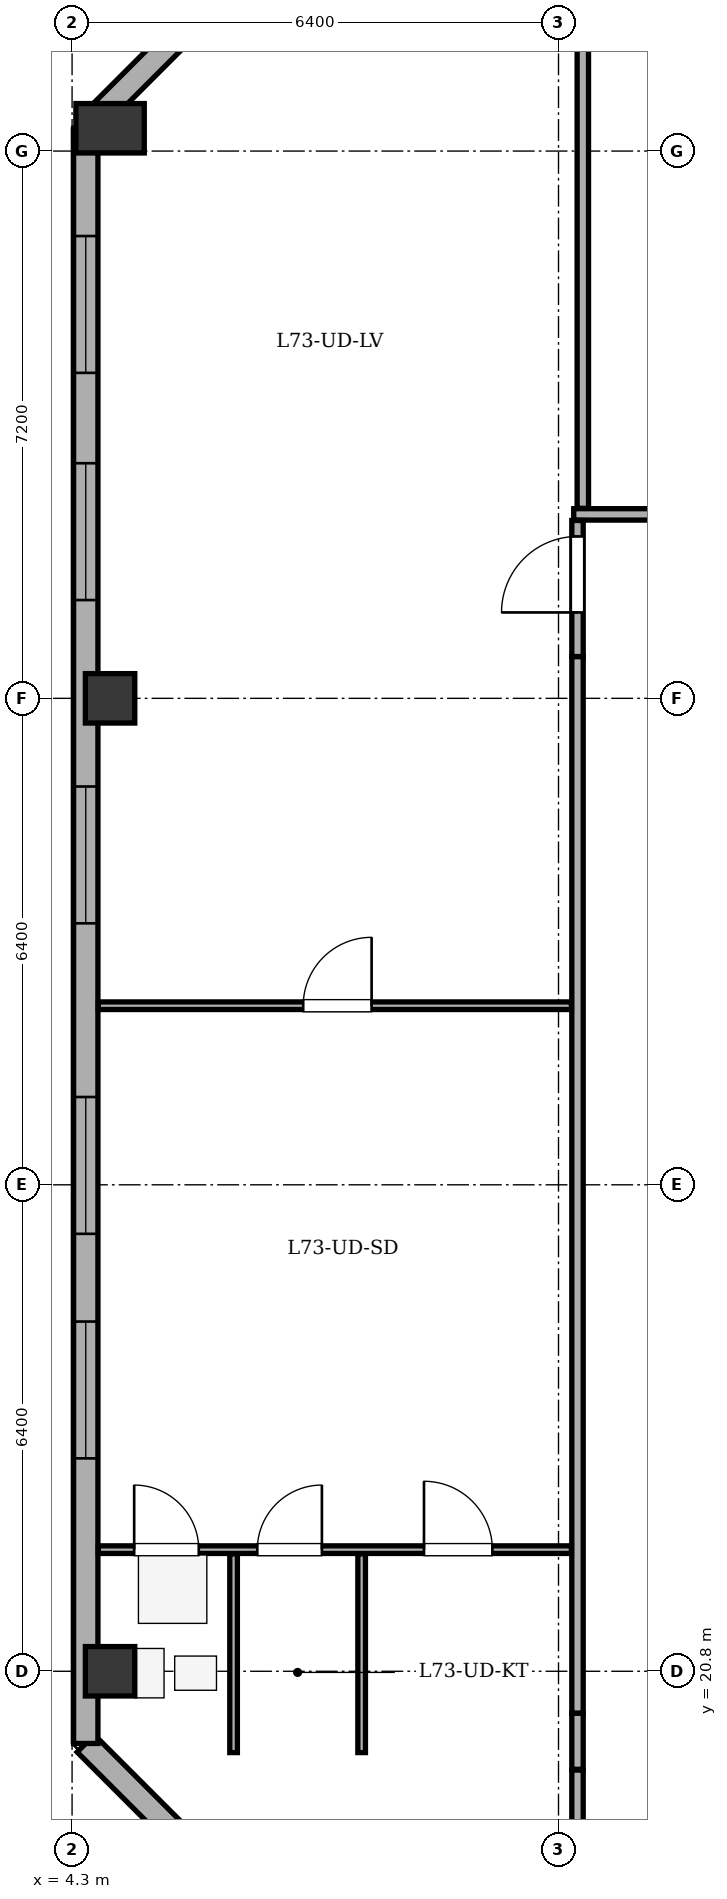
"""IFC4 building model, lengths in metres.
Left out: names, types, materials, properties, quantities, classifications, styles, units other than length and angle.
Written with IfcOpenShell. Run it as: python <this file> out.ifc"""

import sys

from ifc_helpers import new_model, si_unit, direction, frame, frame_2d, origin, origin_2d, place, context, subcontext, project, spatial, rectangle, extrude, element, fill, save


model = new_model("IFC4")
c1 = context("Model", 3, precision=1e-05, world=origin(), true_north=direction((0.0, 1.0)))
c2 = subcontext(c1, "Body", "Model", "MODEL_VIEW")
j1 = project(units=[si_unit("LENGTHUNIT", "METRE"), si_unit("PLANEANGLEUNIT", "RADIAN")], contexts=[c1])
p1 = place(None, origin())
s1 = spatial("IfcSite", under=j1, at=p1, CompositionType="ELEMENT")
p2 = place(p1, origin())
s2 = spatial("IfcBuilding", under=s1, at=p2, CompositionType="ELEMENT")
p3 = place(p2, frame((0.0, 0.0, 275.5)))
s3 = spatial("IfcBuildingStorey", under=s2, at=p3, CompositionType="ELEMENT", Elevation=275.5)
for number, where, z_axis, x_axis in (
    (1, (4.8, 20.8, 0.0), (0.0, 0.0, 1.0), (1.0, 0.0, 0.0)),
    (2, (4.8, 33.6, 0.0), (0.0, 0.0, 1.0), (1.0, 0.0, 0.0)),
):
    element("IfcColumn", number, at=place(p3, frame(where, z_axis=z_axis, x_axis=x_axis)), inside=s3, PredefinedType="COLUMN", context=c2, shape_type="SweptSolid", body=[
        extrude(rectangle(XDim=0.65, YDim=0.65, at=origin_2d()), origin(), (0.0, 0.0, 1.0), 3.4),
    ])
p4 = place(p3, frame((4.8, 41.1, 0.0), z_axis=(0.0, 0.0, 1.0), x_axis=(1.0, 0.0, 0.0)))
e3 = element("IfcColumn", 3, at=p4, inside=s3, PredefinedType="COLUMN", context=c2, shape_type="SweptSolid", body=[
    extrude(rectangle(XDim=0.65, YDim=0.9, at=origin_2d()), origin(), (0.0, 0.0, 1.0), 3.4),
])
p5 = place(p3, frame((8.3, 16.03, 0.0), z_axis=(0.0, 0.0, 1.0), x_axis=(-0.707106781187, 0.707106781187, 0.0)))
e4 = element("IfcWall", 4, at=p5, inside=s3, PredefinedType="STANDARD", context=c2, shape_type="SweptSolid", body=[
    extrude(rectangle(XDim=5.402, YDim=0.32, at=frame_2d((2.701, 0.0))), origin(), (0.0, 0.0, 1.0), 2.725),
])
p6 = place(p5, frame((2.001, 0.0, 0.75)))
e5 = element("IfcOpeningElement", 5, at=p6, cuts=e4, PredefinedType="OPENING", context=c2, shape_type="SweptSolid", body=[
    extrude(rectangle(XDim=1.4, YDim=1.65, at=frame_2d((0.7, 0.825))), frame((0.0, 0.17, 0.0), z_axis=(0.0, -1.0, 0.0), x_axis=(1.0, 0.0, 0.0)), (0.0, 0.0, 1.0), 0.34),
])
p7 = place(p3, frame((4.48, 19.85, 0.0), z_axis=(0.0, 0.0, 1.0), x_axis=(0.0, 1.0, 0.0)))
e6 = element("IfcWall", 6, at=p7, inside=s3, PredefinedType="STANDARD", context=c2, shape_type="SweptSolid", body=[
    extrude(rectangle(XDim=21.25, YDim=0.32, at=frame_2d((10.625, 0.0))), origin(), (0.0, 0.0, 1.0), 2.725),
])
p8 = place(p7, frame((3.751, 0.0, 0.75)))
e7 = element("IfcOpeningElement", 7, at=p8, cuts=e6, PredefinedType="OPENING", context=c2, shape_type="SweptSolid", body=[
    extrude(rectangle(XDim=1.8, YDim=1.7, at=frame_2d((0.9, 0.85))), frame((0.0, 0.17, 0.0), z_axis=(0.0, -1.0, 0.0), x_axis=(1.0, 0.0, 0.0)), (0.0, 0.0, 1.0), 0.34),
])
p9 = place(p7, frame((6.705, 0.0, 0.75)))
e8 = element("IfcOpeningElement", 8, at=p9, cuts=e6, PredefinedType="OPENING", context=c2, shape_type="SweptSolid", body=[
    extrude(rectangle(XDim=1.8, YDim=1.7, at=frame_2d((0.9, 0.85))), frame((0.0, 0.17, 0.0), z_axis=(0.0, -1.0, 0.0), x_axis=(1.0, 0.0, 0.0)), (0.0, 0.0, 1.0), 0.34),
])
p10 = place(p7, frame((10.79, 0.0, 0.75)))
e9 = element("IfcOpeningElement", 9, at=p10, cuts=e6, PredefinedType="OPENING", context=c2, shape_type="SweptSolid", body=[
    extrude(rectangle(XDim=1.8, YDim=1.7, at=frame_2d((0.9, 0.85))), frame((0.0, 0.17, 0.0), z_axis=(0.0, -1.0, 0.0), x_axis=(1.0, 0.0, 0.0)), (0.0, 0.0, 1.0), 0.34),
])
p11 = place(p7, frame((15.043, 0.0, 0.75)))
e10 = element("IfcOpeningElement", 10, at=p11, cuts=e6, PredefinedType="OPENING", context=c2, shape_type="SweptSolid", body=[
    extrude(rectangle(XDim=1.8, YDim=1.7, at=frame_2d((0.9, 0.85))), frame((0.0, 0.17, 0.0), z_axis=(0.0, -1.0, 0.0), x_axis=(1.0, 0.0, 0.0)), (0.0, 0.0, 1.0), 0.34),
])
p12 = place(p7, frame((18.032, 0.0, 0.75)))
e11 = element("IfcOpeningElement", 11, at=p12, cuts=e6, PredefinedType="OPENING", context=c2, shape_type="SweptSolid", body=[
    extrude(rectangle(XDim=1.8, YDim=1.7, at=frame_2d((0.9, 0.85))), frame((0.0, 0.17, 0.0), z_axis=(0.0, -1.0, 0.0), x_axis=(1.0, 0.0, 0.0)), (0.0, 0.0, 1.0), 0.34),
])
p13 = place(p3, frame((4.48, 41.1, 0.0), z_axis=(0.0, 0.0, 1.0), x_axis=(0.70712937715, 0.707084184501, 0.0)))
e12 = element("IfcWall", 12, at=p13, inside=s3, PredefinedType="STANDARD", context=c2, shape_type="SweptSolid", body=[
    extrude(rectangle(XDim=5.402, YDim=0.32, at=frame_2d((2.701, 0.0))), origin(), (0.0, 0.0, 1.0), 2.725),
])
p14 = place(p13, frame((2.001, 0.0, 0.75)))
e13 = element("IfcOpeningElement", 13, at=p14, cuts=e12, PredefinedType="OPENING", context=c2, shape_type="SweptSolid", body=[
    extrude(rectangle(XDim=1.4, YDim=1.65, at=frame_2d((0.7, 0.825))), frame((0.0, 0.17, 0.0), z_axis=(0.0, -1.0, 0.0), x_axis=(1.0, 0.0, 0.0)), (0.0, 0.0, 1.0), 0.34),
])
p15 = place(p3, frame((10.9, 36.02, 0.0), z_axis=(0.0, 0.0, 1.0), x_axis=(1.0, 0.0, 0.0)))
e14 = element("IfcWall", 14, at=p15, inside=s3, PredefinedType="PARTITIONING", context=c2, shape_type="SweptSolid", body=[
    extrude(rectangle(XDim=34.52, YDim=0.15, at=frame_2d((17.26, 0.0))), origin(), (0.0, 0.0, 1.0), 3.1),
])
p16 = place(p15, frame((5.276, 0.0, 0.0)))
e15 = element("IfcOpeningElement", 15, at=p16, cuts=e14, PredefinedType="OPENING", context=c2, shape_type="SweptSolid", body=[
    extrude(rectangle(XDim=1.0, YDim=2.1, at=frame_2d((0.5, 1.05))), frame((0.0, 0.085, 0.0), z_axis=(0.0, -1.0, 0.0), x_axis=(1.0, 0.0, 0.0)), (0.0, 0.0, 1.0), 0.17),
])
p17 = place(p15, frame((16.931, 0.0, 0.0)))
e16 = element("IfcOpeningElement", 16, at=p17, cuts=e14, PredefinedType="OPENING", context=c2, shape_type="SweptSolid", body=[
    extrude(rectangle(XDim=1.0, YDim=2.1, at=frame_2d((0.5, 1.05))), frame((0.0, 0.085, 0.0), z_axis=(0.0, -1.0, 0.0), x_axis=(1.0, 0.0, 0.0)), (0.0, 0.0, 1.0), 0.17),
])
p18 = place(p15, frame((28.415, 0.0, 0.0)))
e17 = element("IfcOpeningElement", 17, at=p18, cuts=e14, PredefinedType="OPENING", context=c2, shape_type="SweptSolid", body=[
    extrude(rectangle(XDim=1.0, YDim=2.1, at=frame_2d((0.5, 1.05))), frame((0.0, 0.085, 0.0), z_axis=(0.0, -1.0, 0.0), x_axis=(1.0, 0.0, 0.0)), (0.0, 0.0, 1.0), 0.17),
])
p19 = place(p3, frame((11.02, 36.1, 0.0), z_axis=(0.0, 0.0, 1.0), x_axis=(0.0, 1.0, 0.0)))
e18 = element("IfcWall", 18, at=p19, inside=s3, PredefinedType="PARTITIONING", context=c2, shape_type="SweptSolid", body=[
    extrude(rectangle(XDim=8.655, YDim=0.15, at=frame_2d((4.327, 0.0))), origin(), (0.0, 0.0, 1.0), 3.1),
])
p20 = place(p3, frame((10.95, 19.5, 0.0), z_axis=(0.0, 0.0, 1.0), x_axis=(0.0, -1.0, 0.0)))
e19 = element("IfcWall", 19, at=p20, inside=s3, PredefinedType="PARTITIONING", context=c2, shape_type="SweptSolid", body=[
    extrude(rectangle(XDim=0.96, YDim=0.15, at=frame_2d((0.48, 0.0))), origin(), (0.0, 0.0, 1.0), 3.1),
])
p21 = place(p3, frame((10.95, 19.51, 0.0), z_axis=(0.0, 0.0, 1.0), x_axis=(0.0, 1.0, 0.0)))
e20 = element("IfcWall", 20, at=p21, inside=s3, PredefinedType="PARTITIONING", context=c2, shape_type="SweptSolid", body=[
    extrude(rectangle(XDim=0.74, YDim=0.15, at=frame_2d((0.37, 0.0))), origin(), (0.0, 0.0, 1.0), 3.1),
])
p22 = place(p3, frame((10.95, 20.25, 0.0), z_axis=(0.0, 0.0, 1.0), x_axis=(0.0, 1.0, 0.0)))
e21 = element("IfcWall", 21, at=p22, inside=s3, PredefinedType="PARTITIONING", context=c2, shape_type="SweptSolid", body=[
    extrude(rectangle(XDim=13.9, YDim=0.15, at=frame_2d((6.95, 0.0))), origin(), (0.0, 0.0, 1.0), 3.1),
])
p23 = place(p3, frame((10.95, 34.15, 0.0), z_axis=(0.0, 0.0, 1.0), x_axis=(0.0, 1.0, 0.0)))
e22 = element("IfcWall", 22, at=p23, inside=s3, PredefinedType="PARTITIONING", context=c2, shape_type="SweptSolid", body=[
    extrude(rectangle(XDim=1.79, YDim=0.15, at=frame_2d((0.895, 0.0))), origin(), (0.0, 0.0, 1.0), 3.1),
])
p24 = place(p23, frame((0.58, 0.0, 0.0)))
e23 = element("IfcOpeningElement", 23, at=p24, cuts=e22, PredefinedType="OPENING", context=c2, shape_type="SweptSolid", body=[
    extrude(rectangle(XDim=1.0, YDim=2.1, at=frame_2d((0.5, 1.05))), frame((0.0, 0.085, 0.0), z_axis=(0.0, -1.0, 0.0), x_axis=(1.0, 0.0, 0.0)), (0.0, 0.0, 1.0), 0.17),
])
p25 = place(p3, frame((4.645, 22.4, 0.0), z_axis=(0.0, 0.0, 1.0), x_axis=(1.0, 0.0, 0.0)))
e24 = element("IfcWall", 24, at=p25, inside=s3, PredefinedType="PARTITIONING", context=c2, shape_type="SweptSolid", body=[
    extrude(rectangle(XDim=6.225, YDim=0.1, at=frame_2d((3.113, 0.0))), origin(), (0.0, 0.0, 1.0), 3.1),
])
p26 = place(p25, frame((0.472, 0.0, 0.0)))
e25 = element("IfcOpeningElement", 25, at=p26, cuts=e24, PredefinedType="OPENING", context=c2, shape_type="SweptSolid", body=[
    extrude(rectangle(XDim=0.85, YDim=2.05, at=frame_2d((0.425, 1.025))), frame((0.0, 0.06, 0.0), z_axis=(0.0, -1.0, 0.0), x_axis=(1.0, 0.0, 0.0)), (0.0, 0.0, 1.0), 0.12),
])
p27 = place(p25, frame((2.092, 0.0, 0.0)))
e26 = element("IfcOpeningElement", 26, at=p27, cuts=e24, PredefinedType="OPENING", context=c2, shape_type="SweptSolid", body=[
    extrude(rectangle(XDim=0.85, YDim=2.05, at=frame_2d((0.425, 1.025))), frame((0.0, 0.06, 0.0), z_axis=(0.0, -1.0, 0.0), x_axis=(1.0, 0.0, 0.0)), (0.0, 0.0, 1.0), 0.12),
])
p28 = place(p25, frame((4.285, 0.0, 0.0)))
e27 = element("IfcOpeningElement", 27, at=p28, cuts=e24, PredefinedType="OPENING", context=c2, shape_type="SweptSolid", body=[
    extrude(rectangle(XDim=0.9, YDim=2.05, at=frame_2d((0.45, 1.025))), frame((0.0, 0.06, 0.0), z_axis=(0.0, -1.0, 0.0), x_axis=(1.0, 0.0, 0.0)), (0.0, 0.0, 1.0), 0.12),
])
p29 = place(p3, frame((4.645, 29.556, 0.0), z_axis=(0.0, 0.0, 1.0), x_axis=(1.0, 0.0, 0.0)))
e28 = element("IfcWall", 28, at=p29, inside=s3, PredefinedType="PARTITIONING", context=c2, shape_type="SweptSolid", body=[
    extrude(rectangle(XDim=6.225, YDim=0.1, at=frame_2d((3.113, 0.0))), origin(), (0.0, 0.0, 1.0), 2.725),
])
p30 = place(p29, frame((2.696, 0.0, 0.0)))
e29 = element("IfcOpeningElement", 29, at=p30, cuts=e28, PredefinedType="OPENING", context=c2, shape_type="SweptSolid", body=[
    extrude(rectangle(XDim=0.9, YDim=2.05, at=frame_2d((0.45, 1.025))), frame((0.0, 0.06, 0.0), z_axis=(0.0, -1.0, 0.0), x_axis=(1.0, 0.0, 0.0)), (0.0, 0.0, 1.0), 0.12),
])
for number, where, z_axis, x_axis in (
    (30, (6.425, 19.73, 0.0), (0.0, 0.0, 1.0), (0.0, 1.0, 0.0)),
    (31, (8.11, 19.73, 0.0), (0.0, 0.0, 1.0), (0.0, 1.0, 0.0)),
):
    element("IfcWall", number, at=place(p3, frame(where, z_axis=z_axis, x_axis=x_axis)), inside=s3, PredefinedType="PARTITIONING", context=c2, shape_type="SweptSolid", body=[
        extrude(rectangle(XDim=2.615, YDim=0.1, at=frame_2d((1.308, 0.0))), origin(), (0.0, 0.0, 1.0), 3.1),
    ])
p31 = place(p8, origin())
e32 = element("IfcWindow", 32, at=p31, inside=s3, PartitioningType="SINGLE_PANEL", PredefinedType="WINDOW", context=c2, shape_type="SweptSolid", body=[
    extrude(rectangle(XDim=1.8, YDim=1.7, at=frame_2d((0.9, 0.85))), frame((0.0, -0.01, 0.0), z_axis=(0.0, -1.0, 0.0), x_axis=(1.0, 0.0, 0.0)), (0.0, 0.0, 1.0), 0.06),
])
fill(e7, e32)
p32 = place(p9, origin())
e33 = element("IfcWindow", 33, at=p32, inside=s3, PartitioningType="SINGLE_PANEL", PredefinedType="WINDOW", context=c2, shape_type="SweptSolid", body=[
    extrude(rectangle(XDim=1.8, YDim=1.7, at=frame_2d((0.9, 0.85))), frame((0.0, -0.01, 0.0), z_axis=(0.0, -1.0, 0.0), x_axis=(1.0, 0.0, 0.0)), (0.0, 0.0, 1.0), 0.06),
])
fill(e8, e33)
p33 = place(p10, origin())
e34 = element("IfcWindow", 34, at=p33, inside=s3, PartitioningType="SINGLE_PANEL", PredefinedType="WINDOW", context=c2, shape_type="SweptSolid", body=[
    extrude(rectangle(XDim=1.8, YDim=1.7, at=frame_2d((0.9, 0.85))), frame((0.0, -0.01, 0.0), z_axis=(0.0, -1.0, 0.0), x_axis=(1.0, 0.0, 0.0)), (0.0, 0.0, 1.0), 0.06),
])
fill(e9, e34)
p34 = place(p11, origin())
e35 = element("IfcWindow", 35, at=p34, inside=s3, PartitioningType="SINGLE_PANEL", PredefinedType="WINDOW", context=c2, shape_type="SweptSolid", body=[
    extrude(rectangle(XDim=1.8, YDim=1.7, at=frame_2d((0.9, 0.85))), frame((0.0, -0.01, 0.0), z_axis=(0.0, -1.0, 0.0), x_axis=(1.0, 0.0, 0.0)), (0.0, 0.0, 1.0), 0.06),
])
fill(e10, e35)
p35 = place(p12, origin())
e36 = element("IfcWindow", 36, at=p35, inside=s3, PartitioningType="SINGLE_PANEL", PredefinedType="WINDOW", context=c2, shape_type="SweptSolid", body=[
    extrude(rectangle(XDim=1.8, YDim=1.7, at=frame_2d((0.9, 0.85))), frame((0.0, -0.01, 0.0), z_axis=(0.0, -1.0, 0.0), x_axis=(1.0, 0.0, 0.0)), (0.0, 0.0, 1.0), 0.06),
])
fill(e11, e36)
p36 = place(p24, origin())
e37 = element("IfcDoor", 37, at=p36, inside=s3, OperationType="SINGLE_SWING_LEFT", PredefinedType="DOOR", context=c2, shape_type="SweptSolid", body=[
    extrude(rectangle(XDim=1.0, YDim=2.1, at=frame_2d((0.5, 1.05))), frame((0.0, 0.025, 0.0), z_axis=(0.0, -1.0, 0.0), x_axis=(1.0, 0.0, 0.0)), (0.0, 0.0, 1.0), 0.05),
])
fill(e23, e37)
p37 = place(p30, origin())
e38 = element("IfcDoor", 38, at=p37, inside=s3, OperationType="SINGLE_SWING_RIGHT", PredefinedType="DOOR", context=c2, shape_type="SweptSolid", body=[
    extrude(rectangle(XDim=0.9, YDim=2.05, at=frame_2d((0.45, 1.025))), frame((0.0, 0.025, 0.0), z_axis=(0.0, -1.0, 0.0), x_axis=(1.0, 0.0, 0.0)), (0.0, 0.0, 1.0), 0.05),
])
fill(e29, e38)
p38 = place(p26, origin())
e39 = element("IfcDoor", 39, at=p38, inside=s3, OperationType="SINGLE_SWING_LEFT", PredefinedType="DOOR", context=c2, shape_type="SweptSolid", body=[
    extrude(rectangle(XDim=0.85, YDim=2.05, at=frame_2d((0.425, 1.025))), frame((0.0, 0.025, 0.0), z_axis=(0.0, -1.0, 0.0), x_axis=(1.0, 0.0, 0.0)), (0.0, 0.0, 1.0), 0.05),
])
fill(e25, e39)
p39 = place(p27, origin())
e40 = element("IfcDoor", 40, at=p39, inside=s3, OperationType="SINGLE_SWING_RIGHT", PredefinedType="DOOR", context=c2, shape_type="SweptSolid", body=[
    extrude(rectangle(XDim=0.85, YDim=2.05, at=frame_2d((0.425, 1.025))), frame((0.0, 0.025, 0.0), z_axis=(0.0, -1.0, 0.0), x_axis=(1.0, 0.0, 0.0)), (0.0, 0.0, 1.0), 0.05),
])
fill(e26, e40)
p40 = place(p28, origin())
e41 = element("IfcDoor", 41, at=p40, inside=s3, OperationType="SINGLE_SWING_LEFT", PredefinedType="DOOR", context=c2, shape_type="SweptSolid", body=[
    extrude(rectangle(XDim=0.9, YDim=2.05, at=frame_2d((0.45, 1.025))), frame((0.0, 0.025, 0.0), z_axis=(0.0, -1.0, 0.0), x_axis=(1.0, 0.0, 0.0)), (0.0, 0.0, 1.0), 0.05),
])
fill(e27, e41)
save(model, sys.argv[1])
